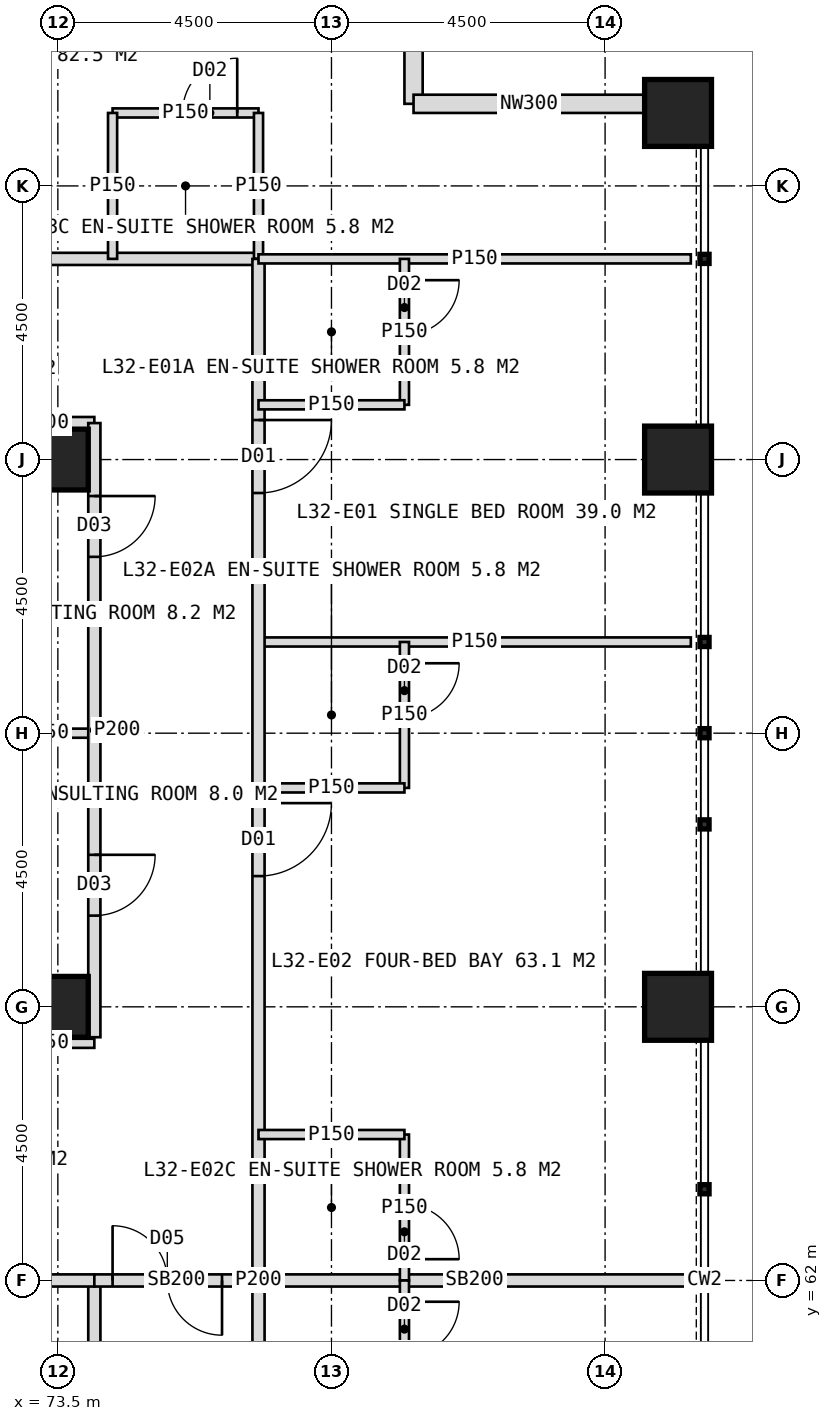
"""IFC4 building model, lengths in metres.
Left out: names, types, materials, properties, quantities, classifications, styles, units other than length and angle.
Written with IfcOpenShell. Run it as: python <this file> out.ifc"""

import sys

from ifc_helpers import new_model, si_unit, direction, frame, frame_2d, origin, origin_2d, place, context, subcontext, project, spatial, rectangle, hollow_rectangle, extrude, element, fill, save


model = new_model("IFC4")
c1 = context("Model", 3, precision=1e-05, world=origin(), true_north=direction((0.0, 1.0)))
c2 = subcontext(c1, "Body", "Model", "MODEL_VIEW")
j1 = project(units=[si_unit("LENGTHUNIT", "METRE"), si_unit("PLANEANGLEUNIT", "RADIAN")], contexts=[c1])
p1 = place(None, origin())
s1 = spatial("IfcSite", under=j1, at=p1, CompositionType="ELEMENT")
p2 = place(p1, origin())
s2 = spatial("IfcBuilding", under=s1, at=p2, CompositionType="ELEMENT")
p3 = place(p2, frame((0.0, 0.0, 136.0)))
s3 = spatial("IfcBuildingStorey", under=s2, at=p3, CompositionType="ELEMENT", Elevation=136.0)
for number, where, z_axis, x_axis in (
    (1, (73.5, 75.5, 0.0), (0.0, 0.0, 1.0), (1.0, 0.0, 0.0)),
    (2, (73.5, 66.5, 0.0), (0.0, 0.0, 1.0), (1.0, 0.0, 0.0)),
):
    element("IfcColumn", number, at=place(p3, frame(where, z_axis=z_axis, x_axis=x_axis)), inside=s3, PredefinedType="COLUMN", context=c2, shape_type="SweptSolid", body=[
        extrude(hollow_rectangle(XDim=1.0, YDim=1.0, WallThickness=0.1, at=origin_2d()), origin(), (0.0, 0.0, 1.0), 4.0),
    ])
for number, where, z_axis, x_axis in (
    (3, (83.7, 66.5, 0.0), (0.0, 0.0, 1.0), (1.0, 0.0, 0.0)),
    (4, (83.7, 75.5, 0.0), (0.0, 0.0, 1.0), (1.0, 0.0, 0.0)),
    (5, (83.7, 81.2, 0.0), (0.0, 0.0, 1.0), (1.0, 0.0, 0.0)),
):
    element("IfcColumn", number, at=place(p3, frame(where, z_axis=z_axis, x_axis=x_axis)), inside=s3, PredefinedType="COLUMN", context=c2, shape_type="SweptSolid", body=[
        extrude(hollow_rectangle(XDim=1.1, YDim=1.1, WallThickness=0.1, at=origin_2d()), origin(), (0.0, 0.0, 1.0), 4.0),
    ])
for number, where, z_axis, x_axis in (
    (6, (79.35, 85.15, 0.0), (0.0, 0.0, 1.0), (0.0, -1.0, 0.0)),
    (7, (79.35, 81.35, 0.0), (0.0, 0.0, 1.0), (1.0, 0.0, 0.0)),
):
    element("IfcWall", number, at=place(p3, frame(where, z_axis=z_axis, x_axis=x_axis)), inside=s3, PredefinedType="ELEMENTEDWALL", context=c2, shape_type="SweptSolid", body=[
        extrude(rectangle(XDim=3.8, YDim=0.3, at=frame_2d((1.9, 0.0))), origin(), (0.0, 0.0, 1.0), 4.0),
    ])
p4 = place(p3, frame((43.2, 78.8, 0.0), z_axis=(0.0, 0.0, 1.0), x_axis=(1.0, 0.0, 0.0)))
e8 = element("IfcWall", 8, at=p4, inside=s3, PredefinedType="PARTITIONING", context=c2, shape_type="SweptSolid", body=[
    extrude(rectangle(XDim=33.6, YDim=0.2, at=frame_2d((16.8, 0.0))), origin(), (0.0, 0.0, 1.0), 3.75),
])
p5 = place(p4, frame((3.25, 0.0, 0.0)))
e9 = element("IfcOpeningElement", 9, at=p5, cuts=e8, PredefinedType="OPENING", context=c2, shape_type="SweptSolid", body=[
    extrude(rectangle(XDim=1.2, YDim=2.2, at=frame_2d((0.6, 1.1))), frame((0.0, 0.11, 0.0), z_axis=(0.0, -1.0, 0.0), x_axis=(1.0, 0.0, 0.0)), (0.0, 0.0, 1.0), 0.22),
])
p6 = place(p4, frame((12.55, 0.0, 0.0)))
e10 = element("IfcOpeningElement", 10, at=p6, cuts=e8, PredefinedType="OPENING", context=c2, shape_type="SweptSolid", body=[
    extrude(rectangle(XDim=1.2, YDim=2.2, at=frame_2d((0.6, 1.1))), frame((0.0, 0.11, 0.0), z_axis=(0.0, -1.0, 0.0), x_axis=(1.0, 0.0, 0.0)), (0.0, 0.0, 1.0), 0.22),
])
p7 = place(p4, frame((26.95, 0.0, 0.0)))
e11 = element("IfcOpeningElement", 11, at=p7, cuts=e8, PredefinedType="OPENING", context=c2, shape_type="SweptSolid", body=[
    extrude(rectangle(XDim=1.2, YDim=2.2, at=frame_2d((0.6, 1.1))), frame((0.0, 0.11, 0.0), z_axis=(0.0, -1.0, 0.0), x_axis=(1.0, 0.0, 0.0)), (0.0, 0.0, 1.0), 0.22),
])
p8 = place(p3, frame((74.4, 81.2, 0.0), z_axis=(0.0, 0.0, 1.0), x_axis=(1.0, 0.0, 0.0)))
e12 = element("IfcWall", 12, at=p8, inside=s3, PredefinedType="PARTITIONING", context=c2, shape_type="SweptSolid", body=[
    extrude(rectangle(XDim=2.4, YDim=0.15, at=frame_2d((1.2, 0.0))), origin(), (0.0, 0.0, 1.0), 2.997),
])
p9 = place(p8, frame((1.15, 0.0, 0.0)))
e13 = element("IfcOpeningElement", 13, at=p9, cuts=e12, PredefinedType="OPENING", context=c2, shape_type="SweptSolid", body=[
    extrude(rectangle(XDim=0.9, YDim=2.1, at=frame_2d((0.45, 1.05))), frame((0.0, 0.085, 0.0), z_axis=(0.0, -1.0, 0.0), x_axis=(1.0, 0.0, 0.0)), (0.0, 0.0, 1.0), 0.17),
])
for number, where, z_axis, x_axis in (
    (14, (74.4, 78.8, 0.0), (0.0, 0.0, 1.0), (0.0, 1.0, 0.0)),
    (15, (76.8, 78.8, 0.0), (0.0, 0.0, 1.0), (0.0, 1.0, 0.0)),
):
    element("IfcWall", number, at=place(p3, frame(where, z_axis=z_axis, x_axis=x_axis)), inside=s3, PredefinedType="PARTITIONING", context=c2, shape_type="SweptSolid", body=[
        extrude(rectangle(XDim=2.4, YDim=0.15, at=frame_2d((1.2, 0.0))), origin(), (0.0, 0.0, 1.0), 3.75),
    ])
p10 = place(p3, frame((72.5, 76.1, 0.0), z_axis=(0.0, 0.0, 1.0), x_axis=(1.0, 0.0, 0.0)))
e16 = element("IfcWall", 16, at=p10, inside=s3, PredefinedType="PARTITIONING", context=c2, shape_type="SweptSolid", body=[
    extrude(rectangle(XDim=1.6, YDim=0.2, at=frame_2d((0.8, 0.0))), origin(), (0.0, 0.0, 1.0), 3.75),
])
p11 = place(p3, frame((76.8, 72.5, 0.0), z_axis=(0.0, 0.0, 1.0), x_axis=(1.0, 0.0, 0.0)))
e17 = element("IfcWall", 17, at=p11, inside=s3, PredefinedType="PARTITIONING", context=c2, shape_type="SweptSolid", body=[
    extrude(rectangle(XDim=7.11, YDim=0.15, at=frame_2d((3.555, 0.0))), origin(), (0.0, 0.0, 1.0), 3.75),
])
p12 = place(p3, frame((76.8, 62.0, 0.0), z_axis=(0.0, 0.0, 1.0), x_axis=(1.0, 0.0, 0.0)))
e18 = element("IfcWall", 18, at=p12, inside=s3, PredefinedType="SOLIDWALL", context=c2, shape_type="SweptSolid", body=[
    extrude(rectangle(XDim=7.11, YDim=0.2, at=frame_2d((3.555, 0.0))), origin(), (0.0, 0.0, 1.0), 2.95),
])
p13 = place(p3, frame((76.8, 78.8, 0.0), z_axis=(0.0, 0.0, 1.0), x_axis=(0.0, -1.0, 0.0)))
e19 = element("IfcWall", 19, at=p13, inside=s3, PredefinedType="PARTITIONING", context=c2, shape_type="SweptSolid", body=[
    extrude(rectangle(XDim=33.6, YDim=0.2, at=frame_2d((16.8, 0.0))), origin(), (0.0, 0.0, 1.0), 3.75),
])
p14 = place(p13, frame((2.65, 0.0, 0.0)))
e20 = element("IfcOpeningElement", 20, at=p14, cuts=e19, PredefinedType="OPENING", context=c2, shape_type="SweptSolid", body=[
    extrude(rectangle(XDim=1.2, YDim=2.2, at=frame_2d((0.6, 1.1))), frame((0.0, 0.11, 0.0), z_axis=(0.0, -1.0, 0.0), x_axis=(1.0, 0.0, 0.0)), (0.0, 0.0, 1.0), 0.22),
])
p15 = place(p13, frame((8.95, 0.0, 0.0)))
e21 = element("IfcOpeningElement", 21, at=p15, cuts=e19, PredefinedType="OPENING", context=c2, shape_type="SweptSolid", body=[
    extrude(rectangle(XDim=1.2, YDim=2.2, at=frame_2d((0.6, 1.1))), frame((0.0, 0.11, 0.0), z_axis=(0.0, -1.0, 0.0), x_axis=(1.0, 0.0, 0.0)), (0.0, 0.0, 1.0), 0.22),
])
p16 = place(p13, frame((19.45, 0.0, 0.0)))
e22 = element("IfcOpeningElement", 22, at=p16, cuts=e19, PredefinedType="OPENING", context=c2, shape_type="SweptSolid", body=[
    extrude(rectangle(XDim=1.2, YDim=2.2, at=frame_2d((0.6, 1.1))), frame((0.0, 0.11, 0.0), z_axis=(0.0, -1.0, 0.0), x_axis=(1.0, 0.0, 0.0)), (0.0, 0.0, 1.0), 0.22),
])
p17 = place(p13, frame((28.45, 0.0, 0.0)))
e23 = element("IfcOpeningElement", 23, at=p17, cuts=e19, PredefinedType="OPENING", context=c2, shape_type="SweptSolid", body=[
    extrude(rectangle(XDim=1.2, YDim=2.2, at=frame_2d((0.6, 1.1))), frame((0.0, 0.11, 0.0), z_axis=(0.0, -1.0, 0.0), x_axis=(1.0, 0.0, 0.0)), (0.0, 0.0, 1.0), 0.22),
])
p18 = place(p3, frame((76.8, 78.8, 0.0), z_axis=(0.0, 0.0, 1.0), x_axis=(1.0, 0.0, 0.0)))
e24 = element("IfcWall", 24, at=p18, inside=s3, PredefinedType="PARTITIONING", context=c2, shape_type="SweptSolid", body=[
    extrude(rectangle(XDim=7.11, YDim=0.15, at=frame_2d((3.555, 0.0))), origin(), (0.0, 0.0, 1.0), 3.75),
])
p19 = place(p3, frame((79.2, 78.8, 0.0), z_axis=(0.0, 0.0, 1.0), x_axis=(0.0, -1.0, 0.0)))
e25 = element("IfcWall", 25, at=p19, inside=s3, PredefinedType="PARTITIONING", context=c2, shape_type="SweptSolid", body=[
    extrude(rectangle(XDim=2.4, YDim=0.15, at=frame_2d((1.2, 0.0))), origin(), (0.0, 0.0, 1.0), 2.997),
])
p20 = place(p19, frame((0.35, 0.0, 0.0)))
e26 = element("IfcOpeningElement", 26, at=p20, cuts=e25, PredefinedType="OPENING", context=c2, shape_type="SweptSolid", body=[
    extrude(rectangle(XDim=0.9, YDim=2.1, at=frame_2d((0.45, 1.05))), frame((0.0, 0.085, 0.0), z_axis=(0.0, -1.0, 0.0), x_axis=(1.0, 0.0, 0.0)), (0.0, 0.0, 1.0), 0.17),
])
p21 = place(p3, frame((76.8, 76.4, 0.0), z_axis=(0.0, 0.0, 1.0), x_axis=(1.0, 0.0, 0.0)))
e27 = element("IfcWall", 27, at=p21, inside=s3, PredefinedType="PARTITIONING", context=c2, shape_type="SweptSolid", body=[
    extrude(rectangle(XDim=2.4, YDim=0.15, at=frame_2d((1.2, 0.0))), origin(), (0.0, 0.0, 1.0), 3.75),
])
p22 = place(p3, frame((79.2, 72.5, 0.0), z_axis=(0.0, 0.0, 1.0), x_axis=(0.0, -1.0, 0.0)))
e28 = element("IfcWall", 28, at=p22, inside=s3, PredefinedType="PARTITIONING", context=c2, shape_type="SweptSolid", body=[
    extrude(rectangle(XDim=2.4, YDim=0.15, at=frame_2d((1.2, 0.0))), origin(), (0.0, 0.0, 1.0), 3.75),
])
p23 = place(p22, frame((0.35, 0.0, 0.0)))
e29 = element("IfcOpeningElement", 29, at=p23, cuts=e28, PredefinedType="OPENING", context=c2, shape_type="SweptSolid", body=[
    extrude(rectangle(XDim=0.9, YDim=2.1, at=frame_2d((0.45, 1.05))), frame((0.0, 0.085, 0.0), z_axis=(0.0, -1.0, 0.0), x_axis=(1.0, 0.0, 0.0)), (0.0, 0.0, 1.0), 0.17),
])
p24 = place(p3, frame((76.8, 70.1, 0.0), z_axis=(0.0, 0.0, 1.0), x_axis=(1.0, 0.0, 0.0)))
e30 = element("IfcWall", 30, at=p24, inside=s3, PredefinedType="PARTITIONING", context=c2, shape_type="SweptSolid", body=[
    extrude(rectangle(XDim=2.4, YDim=0.15, at=frame_2d((1.2, 0.0))), origin(), (0.0, 0.0, 1.0), 3.75),
])
p25 = place(p3, frame((79.2, 64.4, 0.0), z_axis=(0.0, 0.0, 1.0), x_axis=(0.0, -1.0, 0.0)))
e31 = element("IfcWall", 31, at=p25, inside=s3, PredefinedType="PARTITIONING", context=c2, shape_type="SweptSolid", body=[
    extrude(rectangle(XDim=2.4, YDim=0.15, at=frame_2d((1.2, 0.0))), origin(), (0.0, 0.0, 1.0), 3.75),
])
p26 = place(p25, frame((1.15, 0.0, 0.0)))
e32 = element("IfcOpeningElement", 32, at=p26, cuts=e31, PredefinedType="OPENING", context=c2, shape_type="SweptSolid", body=[
    extrude(rectangle(XDim=0.9, YDim=2.1, at=frame_2d((0.45, 1.05))), frame((0.0, 0.085, 0.0), z_axis=(0.0, -1.0, 0.0), x_axis=(1.0, 0.0, 0.0)), (0.0, 0.0, 1.0), 0.17),
])
p27 = place(p3, frame((76.8, 64.4, 0.0), z_axis=(0.0, 0.0, 1.0), x_axis=(1.0, 0.0, 0.0)))
e33 = element("IfcWall", 33, at=p27, inside=s3, PredefinedType="PARTITIONING", context=c2, shape_type="SweptSolid", body=[
    extrude(rectangle(XDim=2.4, YDim=0.15, at=frame_2d((1.2, 0.0))), origin(), (0.0, 0.0, 1.0), 3.75),
])
p28 = place(p3, frame((79.2, 62.0, 0.0), z_axis=(0.0, 0.0, 1.0), x_axis=(0.0, -1.0, 0.0)))
e34 = element("IfcWall", 34, at=p28, inside=s3, PredefinedType="PARTITIONING", context=c2, shape_type="SweptSolid", body=[
    extrude(rectangle(XDim=2.4, YDim=0.15, at=frame_2d((1.2, 0.0))), origin(), (0.0, 0.0, 1.0), 3.75),
])
p29 = place(p28, frame((0.35, 0.0, 0.0)))
e35 = element("IfcOpeningElement", 35, at=p29, cuts=e34, PredefinedType="OPENING", context=c2, shape_type="SweptSolid", body=[
    extrude(rectangle(XDim=0.9, YDim=2.1, at=frame_2d((0.45, 1.05))), frame((0.0, 0.085, 0.0), z_axis=(0.0, -1.0, 0.0), x_axis=(1.0, 0.0, 0.0)), (0.0, 0.0, 1.0), 0.17),
])
p30 = place(p3, frame((72.5, 71.0, 0.0), z_axis=(0.0, 0.0, 1.0), x_axis=(1.0, 0.0, 0.0)))
e36 = element("IfcWall", 36, at=p30, inside=s3, PredefinedType="PARTITIONING", context=c2, shape_type="SweptSolid", body=[
    extrude(rectangle(XDim=1.6, YDim=0.15, at=frame_2d((0.8, 0.0))), origin(), (0.0, 0.0, 1.0), 3.75),
])
p31 = place(p3, frame((74.1, 76.1, 0.0), z_axis=(0.0, 0.0, 1.0), x_axis=(0.0, -1.0, 0.0)))
e37 = element("IfcWall", 37, at=p31, inside=s3, PredefinedType="PARTITIONING", context=c2, shape_type="SweptSolid", body=[
    extrude(rectangle(XDim=10.1, YDim=0.2, at=frame_2d((5.05, 0.0))), origin(), (0.0, 0.0, 1.0), 3.75),
])
p32 = place(p31, frame((1.2, 0.0, 0.0)))
e38 = element("IfcOpeningElement", 38, at=p32, cuts=e37, PredefinedType="OPENING", context=c2, shape_type="SweptSolid", body=[
    extrude(rectangle(XDim=1.0, YDim=2.1, at=frame_2d((0.5, 1.05))), frame((0.0, 0.11, 0.0), z_axis=(0.0, -1.0, 0.0), x_axis=(1.0, 0.0, 0.0)), (0.0, 0.0, 1.0), 0.22),
])
p33 = place(p31, frame((7.1, 0.0, 0.0)))
e39 = element("IfcOpeningElement", 39, at=p33, cuts=e37, PredefinedType="OPENING", context=c2, shape_type="SweptSolid", body=[
    extrude(rectangle(XDim=1.0, YDim=2.1, at=frame_2d((0.5, 1.05))), frame((0.0, 0.11, 0.0), z_axis=(0.0, -1.0, 0.0), x_axis=(1.0, 0.0, 0.0)), (0.0, 0.0, 1.0), 0.22),
])
p34 = place(p3, frame((74.1, 62.0, 0.0), z_axis=(0.0, 0.0, 1.0), x_axis=(0.0, -1.0, 0.0)))
e40 = element("IfcWall", 40, at=p34, inside=s3, PredefinedType="PARTITIONING", context=c2, shape_type="SweptSolid", body=[
    extrude(rectangle(XDim=14.1, YDim=0.2, at=frame_2d((7.05, 0.0))), origin(), (0.0, 0.0, 1.0), 3.75),
])
p35 = place(p34, frame((2.5, 0.0, 0.0)))
e41 = element("IfcOpeningElement", 41, at=p35, cuts=e40, PredefinedType="OPENING", context=c2, shape_type="SweptSolid", body=[
    extrude(rectangle(XDim=1.0, YDim=2.1, at=frame_2d((0.5, 1.05))), frame((0.0, 0.11, 0.0), z_axis=(0.0, -1.0, 0.0), x_axis=(1.0, 0.0, 0.0)), (0.0, 0.0, 1.0), 0.22),
])
p36 = place(p34, frame((7.75, 0.0, 0.0)))
e42 = element("IfcOpeningElement", 42, at=p36, cuts=e40, PredefinedType="OPENING", context=c2, shape_type="SweptSolid", body=[
    extrude(rectangle(XDim=1.0, YDim=2.1, at=frame_2d((0.5, 1.05))), frame((0.0, 0.11, 0.0), z_axis=(0.0, -1.0, 0.0), x_axis=(1.0, 0.0, 0.0)), (0.0, 0.0, 1.0), 0.22),
])
p37 = place(p34, frame((11.2, 0.0, 0.0)))
e43 = element("IfcOpeningElement", 43, at=p37, cuts=e40, PredefinedType="OPENING", context=c2, shape_type="SweptSolid", body=[
    extrude(rectangle(XDim=1.0, YDim=2.1, at=frame_2d((0.5, 1.05))), frame((0.0, 0.11, 0.0), z_axis=(0.0, -1.0, 0.0), x_axis=(1.0, 0.0, 0.0)), (0.0, 0.0, 1.0), 0.22),
])
p38 = place(p3, frame((72.5, 65.9, 0.0), z_axis=(0.0, 0.0, 1.0), x_axis=(1.0, 0.0, 0.0)))
e44 = element("IfcWall", 44, at=p38, inside=s3, PredefinedType="PARTITIONING", context=c2, shape_type="SweptSolid", body=[
    extrude(rectangle(XDim=1.6, YDim=0.15, at=frame_2d((0.8, 0.0))), origin(), (0.0, 0.0, 1.0), 3.75),
])
p39 = place(p3, frame((69.0, 62.0, 0.0), z_axis=(0.0, 0.0, 1.0), x_axis=(1.0, 0.0, 0.0)))
e45 = element("IfcWall", 45, at=p39, inside=s3, PredefinedType="SOLIDWALL", context=c2, shape_type="SweptSolid", body=[
    extrude(rectangle(XDim=5.1, YDim=0.2, at=frame_2d((2.55, 0.0))), origin(), (0.0, 0.0, 1.0), 2.95),
])
p40 = place(p3, frame((74.1, 62.0, 0.0), z_axis=(0.0, 0.0, 1.0), x_axis=(1.0, 0.0, 0.0)))
e46 = element("IfcWall", 46, at=p40, inside=s3, PredefinedType="SOLIDWALL", context=c2, shape_type="SweptSolid", body=[
    extrude(rectangle(XDim=2.7, YDim=0.2, at=frame_2d((1.35, 0.0))), origin(), (0.0, 0.0, 1.0), 2.95),
])
p41 = place(p40, frame((0.3, 0.0, 0.0)))
e47 = element("IfcOpeningElement", 47, at=p41, cuts=e46, PredefinedType="OPENING", context=c2, shape_type="SweptSolid", body=[
    extrude(rectangle(XDim=1.8, YDim=2.2, at=frame_2d((0.9, 1.1))), frame((0.0, 0.11, 0.0), z_axis=(0.0, -1.0, 0.0), x_axis=(1.0, 0.0, 0.0)), (0.0, 0.0, 1.0), 0.22),
])
p42 = place(p9, origin())
e48 = element("IfcDoor", 48, at=p42, inside=s3, OperationType="SINGLE_SWING_RIGHT", PredefinedType="DOOR", context=c2, shape_type="SweptSolid", body=[
    extrude(rectangle(XDim=0.9, YDim=2.1, at=frame_2d((0.45, 1.05))), frame((0.0, 0.025, 0.0), z_axis=(0.0, -1.0, 0.0), x_axis=(1.0, 0.0, 0.0)), (0.0, 0.0, 1.0), 0.05),
])
fill(e13, e48)
p43 = place(p32, origin())
e49 = element("IfcDoor", 49, at=p43, inside=s3, OperationType="SINGLE_SWING_LEFT", PredefinedType="DOOR", context=c2, shape_type="SweptSolid", body=[
    extrude(rectangle(XDim=1.0, YDim=2.1, at=frame_2d((0.5, 1.05))), frame((0.0, 0.025, 0.0), z_axis=(0.0, -1.0, 0.0), x_axis=(1.0, 0.0, 0.0)), (0.0, 0.0, 1.0), 0.05),
])
fill(e38, e49)
p44 = place(p14, origin())
e50 = element("IfcDoor", 50, at=p44, inside=s3, OperationType="SINGLE_SWING_LEFT", PredefinedType="DOOR", context=c2, shape_type="SweptSolid", body=[
    extrude(rectangle(XDim=1.2, YDim=2.2, at=frame_2d((0.6, 1.1))), frame((0.0, 0.025, 0.0), z_axis=(0.0, -1.0, 0.0), x_axis=(1.0, 0.0, 0.0)), (0.0, 0.0, 1.0), 0.05),
])
fill(e20, e50)
p45 = place(p20, origin())
e51 = element("IfcDoor", 51, at=p45, inside=s3, OperationType="SINGLE_SWING_LEFT", PredefinedType="DOOR", context=c2, shape_type="SweptSolid", body=[
    extrude(rectangle(XDim=0.9, YDim=2.1, at=frame_2d((0.45, 1.05))), frame((0.0, 0.025, 0.0), z_axis=(0.0, -1.0, 0.0), x_axis=(1.0, 0.0, 0.0)), (0.0, 0.0, 1.0), 0.05),
])
fill(e26, e51)
p46 = place(p15, origin())
e52 = element("IfcDoor", 52, at=p46, inside=s3, OperationType="SINGLE_SWING_LEFT", PredefinedType="DOOR", context=c2, shape_type="SweptSolid", body=[
    extrude(rectangle(XDim=1.2, YDim=2.2, at=frame_2d((0.6, 1.1))), frame((0.0, 0.025, 0.0), z_axis=(0.0, -1.0, 0.0), x_axis=(1.0, 0.0, 0.0)), (0.0, 0.0, 1.0), 0.05),
])
fill(e21, e52)
p47 = place(p23, origin())
e53 = element("IfcDoor", 53, at=p47, inside=s3, OperationType="SINGLE_SWING_LEFT", PredefinedType="DOOR", context=c2, shape_type="SweptSolid", body=[
    extrude(rectangle(XDim=0.9, YDim=2.1, at=frame_2d((0.45, 1.05))), frame((0.0, 0.025, 0.0), z_axis=(0.0, -1.0, 0.0), x_axis=(1.0, 0.0, 0.0)), (0.0, 0.0, 1.0), 0.05),
])
fill(e29, e53)
p48 = place(p26, origin())
e54 = element("IfcDoor", 54, at=p48, inside=s3, OperationType="SINGLE_SWING_RIGHT", PredefinedType="DOOR", context=c2, shape_type="SweptSolid", body=[
    extrude(rectangle(XDim=0.9, YDim=2.1, at=frame_2d((0.45, 1.05))), frame((0.0, 0.025, 0.0), z_axis=(0.0, -1.0, 0.0), x_axis=(1.0, 0.0, 0.0)), (0.0, 0.0, 1.0), 0.05),
])
fill(e32, e54)
p49 = place(p29, origin())
e55 = element("IfcDoor", 55, at=p49, inside=s3, OperationType="SINGLE_SWING_LEFT", PredefinedType="DOOR", context=c2, shape_type="SweptSolid", body=[
    extrude(rectangle(XDim=0.9, YDim=2.1, at=frame_2d((0.45, 1.05))), frame((0.0, 0.025, 0.0), z_axis=(0.0, -1.0, 0.0), x_axis=(1.0, 0.0, 0.0)), (0.0, 0.0, 1.0), 0.05),
])
fill(e35, e55)
p50 = place(p33, origin())
e56 = element("IfcDoor", 56, at=p50, inside=s3, OperationType="SINGLE_SWING_LEFT", PredefinedType="DOOR", context=c2, shape_type="SweptSolid", body=[
    extrude(rectangle(XDim=1.0, YDim=2.1, at=frame_2d((0.5, 1.05))), frame((0.0, 0.025, 0.0), z_axis=(0.0, -1.0, 0.0), x_axis=(1.0, 0.0, 0.0)), (0.0, 0.0, 1.0), 0.05),
])
fill(e39, e56)
p51 = place(p41, origin())
e57 = element("IfcDoor", 57, at=p51, inside=s3, OperationType="DOUBLE_DOOR_DOUBLE_SWING", PredefinedType="DOOR", context=c2, shape_type="SweptSolid", body=[
    extrude(rectangle(XDim=1.8, YDim=2.2, at=frame_2d((0.9, 1.1))), frame((0.0, 0.025, 0.0), z_axis=(0.0, -1.0, 0.0), x_axis=(1.0, 0.0, 0.0)), (0.0, 0.0, 1.0), 0.05),
])
fill(e47, e57)
save(model, sys.argv[1])
